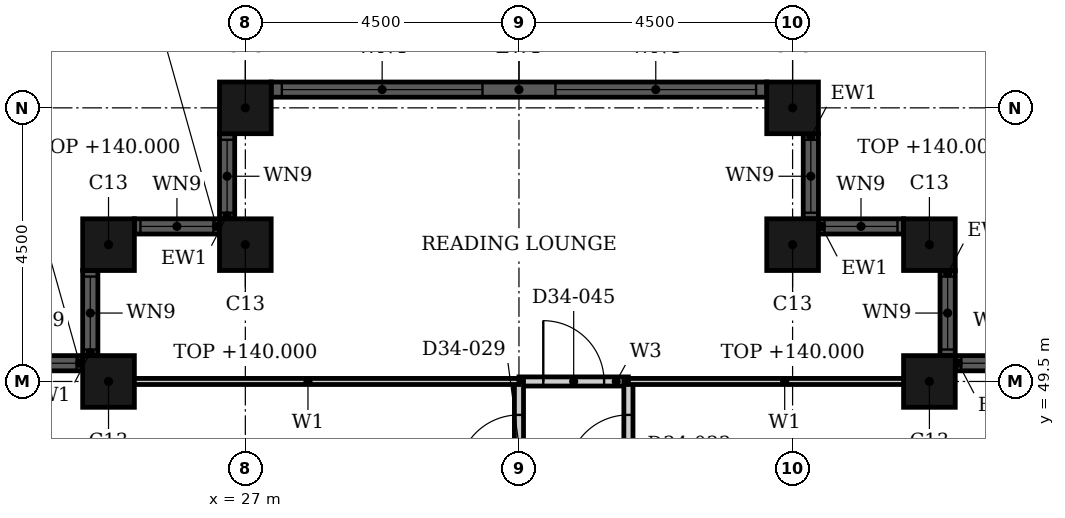
"""IFC4 building model, lengths in metres.
Left out: names, types, materials, properties, quantities, classifications, styles, units other than length and angle.
Written with IfcOpenShell. Run it as: python <this file> out.ifc"""

import sys

from ifc_helpers import new_model, si_unit, direction, frame, frame_2d, origin, origin_2d, place, context, subcontext, project, spatial, rectangle, hollow_rectangle, extrude, element, fill, save


model = new_model("IFC4")
c1 = context("Model", 3, precision=1e-05, world=origin(), true_north=direction((0.0, 1.0)))
c2 = subcontext(c1, "Body", "Model", "MODEL_VIEW")
j1 = project(units=[si_unit("LENGTHUNIT", "METRE"), si_unit("PLANEANGLEUNIT", "RADIAN")], contexts=[c1])
p1 = place(None, origin())
s1 = spatial("IfcSite", under=j1, at=p1, CompositionType="ELEMENT")
p2 = place(p1, origin())
s2 = spatial("IfcBuilding", under=s1, at=p2, CompositionType="ELEMENT")
p3 = place(p2, frame((0.0, 0.0, 136.8)))
s3 = spatial("IfcBuildingStorey", under=s2, at=p3, CompositionType="ELEMENT", Elevation=136.8)
for number, where, z_axis, x_axis in (
    (1, (38.25, 49.5, 0.0), (0.0, 0.0, 1.0), (1.0, 0.0, 0.0)),
    (2, (38.25, 51.75, 0.0), (0.0, 0.0, 1.0), (1.0, 0.0, 0.0)),
    (3, (36.0, 51.75, 0.0), (0.0, 0.0, 1.0), (1.0, 0.0, 0.0)),
    (4, (36.0, 54.0, 0.0), (0.0, 0.0, 1.0), (1.0, 0.0, 0.0)),
    (5, (27.0, 54.0, 0.0), (0.0, 0.0, 1.0), (1.0, 0.0, 0.0)),
    (6, (27.0, 51.75, 0.0), (0.0, 0.0, 1.0), (1.0, 0.0, 0.0)),
    (7, (24.75, 51.75, 0.0), (0.0, 0.0, 1.0), (1.0, 0.0, 0.0)),
    (8, (24.75, 49.5, 0.0), (0.0, 0.0, 1.0), (1.0, 0.0, 0.0)),
):
    element("IfcColumn", number, at=place(p3, frame(where, z_axis=z_axis, x_axis=x_axis)), inside=s3, PredefinedType="COLUMN", context=c2, shape_type="SweptSolid", body=[
        extrude(hollow_rectangle(XDim=0.85, YDim=0.85, WallThickness=0.026, at=origin_2d()), origin(), (0.0, 0.0, 1.0), 3.2),
    ])
p4 = place(p3, frame((40.075, 49.8, 0.0), z_axis=(0.0, 0.0, 1.0), x_axis=(-1.0, 0.0, 0.0)))
e9 = element("IfcWall", 9, at=p4, inside=s3, PredefinedType="SOLIDWALL", context=c2, shape_type="SweptSolid", body=[
    extrude(rectangle(XDim=1.4, YDim=0.25, at=frame_2d((0.7, 0.0))), origin(), (0.0, 0.0, 1.0), 3.6),
])
p5 = place(p4, frame((0.1, 0.0, 0.9)))
e10 = element("IfcOpeningElement", 10, at=p5, cuts=e9, PredefinedType="OPENING", context=c2, shape_type="SweptSolid", body=[
    extrude(rectangle(XDim=1.2, YDim=2.08, at=frame_2d((0.6, 1.04))), frame((0.0, 0.135, 0.0), z_axis=(0.0, -1.0, 0.0), x_axis=(1.0, 0.0, 0.0)), (0.0, 0.0, 1.0), 0.27),
])
p6 = place(p3, frame((38.55, 49.925, 0.0), z_axis=(0.0, 0.0, 1.0), x_axis=(0.0, 1.0, 0.0)))
e11 = element("IfcWall", 11, at=p6, inside=s3, PredefinedType="SOLIDWALL", context=c2, shape_type="SweptSolid", body=[
    extrude(rectangle(XDim=1.4, YDim=0.25, at=frame_2d((0.7, 0.0))), origin(), (0.0, 0.0, 1.0), 3.6),
])
p7 = place(p6, frame((0.1, 0.0, 0.9)))
e12 = element("IfcOpeningElement", 12, at=p7, cuts=e11, PredefinedType="OPENING", context=c2, shape_type="SweptSolid", body=[
    extrude(rectangle(XDim=1.2, YDim=2.08, at=frame_2d((0.6, 1.04))), frame((0.0, 0.135, 0.0), z_axis=(0.0, -1.0, 0.0), x_axis=(1.0, 0.0, 0.0)), (0.0, 0.0, 1.0), 0.27),
])
p8 = place(p3, frame((37.825, 52.05, 0.0), z_axis=(0.0, 0.0, 1.0), x_axis=(-1.0, 0.0, 0.0)))
e13 = element("IfcWall", 13, at=p8, inside=s3, PredefinedType="SOLIDWALL", context=c2, shape_type="SweptSolid", body=[
    extrude(rectangle(XDim=1.4, YDim=0.25, at=frame_2d((0.7, 0.0))), origin(), (0.0, 0.0, 1.0), 3.6),
])
p9 = place(p8, frame((0.1, 0.0, 0.9)))
e14 = element("IfcOpeningElement", 14, at=p9, cuts=e13, PredefinedType="OPENING", context=c2, shape_type="SweptSolid", body=[
    extrude(rectangle(XDim=1.2, YDim=2.08, at=frame_2d((0.6, 1.04))), frame((0.0, 0.135, 0.0), z_axis=(0.0, -1.0, 0.0), x_axis=(1.0, 0.0, 0.0)), (0.0, 0.0, 1.0), 0.27),
])
p10 = place(p3, frame((36.3, 52.175, 0.0), z_axis=(0.0, 0.0, 1.0), x_axis=(0.0, 1.0, 0.0)))
e15 = element("IfcWall", 15, at=p10, inside=s3, PredefinedType="SOLIDWALL", context=c2, shape_type="SweptSolid", body=[
    extrude(rectangle(XDim=1.4, YDim=0.25, at=frame_2d((0.7, 0.0))), origin(), (0.0, 0.0, 1.0), 3.6),
])
p11 = place(p10, frame((0.1, 0.0, 0.9)))
e16 = element("IfcOpeningElement", 16, at=p11, cuts=e15, PredefinedType="OPENING", context=c2, shape_type="SweptSolid", body=[
    extrude(rectangle(XDim=1.2, YDim=2.08, at=frame_2d((0.6, 1.04))), frame((0.0, 0.135, 0.0), z_axis=(0.0, -1.0, 0.0), x_axis=(1.0, 0.0, 0.0)), (0.0, 0.0, 1.0), 0.27),
])
p12 = place(p3, frame((35.575, 54.3, 0.0), z_axis=(0.0, 0.0, 1.0), x_axis=(-1.0, 0.0, 0.0)))
e17 = element("IfcWall", 17, at=p12, inside=s3, PredefinedType="SOLIDWALL", context=c2, shape_type="SweptSolid", body=[
    extrude(rectangle(XDim=8.15, YDim=0.25, at=frame_2d((4.075, 0.0))), origin(), (0.0, 0.0, 1.0), 3.6),
])
p13 = place(p12, frame((0.175, 0.0, 0.9)))
e18 = element("IfcOpeningElement", 18, at=p13, cuts=e17, PredefinedType="OPENING", context=c2, shape_type="SweptSolid", body=[
    extrude(rectangle(XDim=3.3, YDim=2.08, at=frame_2d((1.65, 1.04))), frame((0.0, 0.135, 0.0), z_axis=(0.0, -1.0, 0.0), x_axis=(1.0, 0.0, 0.0)), (0.0, 0.0, 1.0), 0.27),
])
p14 = place(p12, frame((4.675, 0.0, 0.9)))
e19 = element("IfcOpeningElement", 19, at=p14, cuts=e17, PredefinedType="OPENING", context=c2, shape_type="SweptSolid", body=[
    extrude(rectangle(XDim=3.3, YDim=2.08, at=frame_2d((1.65, 1.04))), frame((0.0, 0.135, 0.0), z_axis=(0.0, -1.0, 0.0), x_axis=(1.0, 0.0, 0.0)), (0.0, 0.0, 1.0), 0.27),
])
p15 = place(p3, frame((26.7, 53.575, 0.0), z_axis=(0.0, 0.0, 1.0), x_axis=(0.0, -1.0, 0.0)))
e20 = element("IfcWall", 20, at=p15, inside=s3, PredefinedType="SOLIDWALL", context=c2, shape_type="SweptSolid", body=[
    extrude(rectangle(XDim=1.4, YDim=0.25, at=frame_2d((0.7, 0.0))), origin(), (0.0, 0.0, 1.0), 3.6),
])
p16 = place(p15, frame((0.1, 0.0, 0.9)))
e21 = element("IfcOpeningElement", 21, at=p16, cuts=e20, PredefinedType="OPENING", context=c2, shape_type="SweptSolid", body=[
    extrude(rectangle(XDim=1.2, YDim=2.08, at=frame_2d((0.6, 1.04))), frame((0.0, 0.135, 0.0), z_axis=(0.0, -1.0, 0.0), x_axis=(1.0, 0.0, 0.0)), (0.0, 0.0, 1.0), 0.27),
])
p17 = place(p3, frame((26.575, 52.05, 0.0), z_axis=(0.0, 0.0, 1.0), x_axis=(-1.0, 0.0, 0.0)))
e22 = element("IfcWall", 22, at=p17, inside=s3, PredefinedType="SOLIDWALL", context=c2, shape_type="SweptSolid", body=[
    extrude(rectangle(XDim=1.4, YDim=0.25, at=frame_2d((0.7, 0.0))), origin(), (0.0, 0.0, 1.0), 3.6),
])
p18 = place(p17, frame((0.1, 0.0, 0.9)))
e23 = element("IfcOpeningElement", 23, at=p18, cuts=e22, PredefinedType="OPENING", context=c2, shape_type="SweptSolid", body=[
    extrude(rectangle(XDim=1.2, YDim=2.08, at=frame_2d((0.6, 1.04))), frame((0.0, 0.135, 0.0), z_axis=(0.0, -1.0, 0.0), x_axis=(1.0, 0.0, 0.0)), (0.0, 0.0, 1.0), 0.27),
])
p19 = place(p3, frame((24.45, 51.325, 0.0), z_axis=(0.0, 0.0, 1.0), x_axis=(0.0, -1.0, 0.0)))
e24 = element("IfcWall", 24, at=p19, inside=s3, PredefinedType="SOLIDWALL", context=c2, shape_type="SweptSolid", body=[
    extrude(rectangle(XDim=1.4, YDim=0.25, at=frame_2d((0.7, 0.0))), origin(), (0.0, 0.0, 1.0), 3.6),
])
p20 = place(p19, frame((0.1, 0.0, 0.9)))
e25 = element("IfcOpeningElement", 25, at=p20, cuts=e24, PredefinedType="OPENING", context=c2, shape_type="SweptSolid", body=[
    extrude(rectangle(XDim=1.2, YDim=2.08, at=frame_2d((0.6, 1.04))), frame((0.0, 0.135, 0.0), z_axis=(0.0, -1.0, 0.0), x_axis=(1.0, 0.0, 0.0)), (0.0, 0.0, 1.0), 0.27),
])
p21 = place(p3, frame((24.325, 49.8, 0.0), z_axis=(0.0, 0.0, 1.0), x_axis=(-1.0, 0.0, 0.0)))
e26 = element("IfcWall", 26, at=p21, inside=s3, PredefinedType="SOLIDWALL", context=c2, shape_type="SweptSolid", body=[
    extrude(rectangle(XDim=1.4, YDim=0.25, at=frame_2d((0.7, 0.0))), origin(), (0.0, 0.0, 1.0), 3.6),
])
p22 = place(p21, frame((0.1, 0.0, 0.9)))
e27 = element("IfcOpeningElement", 27, at=p22, cuts=e26, PredefinedType="OPENING", context=c2, shape_type="SweptSolid", body=[
    extrude(rectangle(XDim=1.2, YDim=2.08, at=frame_2d((0.6, 1.04))), frame((0.0, 0.135, 0.0), z_axis=(0.0, -1.0, 0.0), x_axis=(1.0, 0.0, 0.0)), (0.0, 0.0, 1.0), 0.27),
])
p23 = place(p3, frame((31.5, 49.5, 0.0), z_axis=(0.0, 0.0, 1.0), x_axis=(1.0, 0.0, 0.0)))
e28 = element("IfcWall", 28, at=p23, inside=s3, PredefinedType="PARTITIONING", context=c2, shape_type="SweptSolid", body=[
    extrude(rectangle(XDim=1.8, YDim=0.15, at=frame_2d((0.9, 0.0))), origin(), (0.0, 0.0, 1.0), 3.2),
])
p24 = place(p23, frame((0.4, 0.0, 0.0)))
e29 = element("IfcOpeningElement", 29, at=p24, cuts=e28, PredefinedType="OPENING", context=c2, shape_type="SweptSolid", body=[
    extrude(rectangle(XDim=1.0, YDim=2.1, at=frame_2d((0.5, 1.05))), frame((0.0, 0.085, 0.0), z_axis=(0.0, -1.0, 0.0), x_axis=(1.0, 0.0, 0.0)), (0.0, 0.0, 1.0), 0.17),
])
p25 = place(p3, frame((31.5, 33.3, 0.0), z_axis=(0.0, 0.0, 1.0), x_axis=(0.0, 1.0, 0.0)))
e30 = element("IfcWall", 30, at=p25, inside=s3, PredefinedType="PARTITIONING", context=c2, shape_type="SweptSolid", body=[
    extrude(rectangle(XDim=16.2, YDim=0.15, at=frame_2d((8.1, 0.0))), origin(), (0.0, 0.0, 1.0), 2.48),
])
p26 = place(p25, frame((10.15, 0.0, 0.0)))
e31 = element("IfcOpeningElement", 31, at=p26, cuts=e30, PredefinedType="OPENING", context=c2, shape_type="SweptSolid", body=[
    extrude(rectangle(XDim=1.0, YDim=2.1, at=frame_2d((0.5, 1.05))), frame((0.0, 0.085, 0.0), z_axis=(0.0, -1.0, 0.0), x_axis=(1.0, 0.0, 0.0)), (0.0, 0.0, 1.0), 0.17),
])
p27 = place(p25, frame((14.65, 0.0, 0.0)))
e32 = element("IfcOpeningElement", 32, at=p27, cuts=e30, PredefinedType="OPENING", context=c2, shape_type="SweptSolid", body=[
    extrude(rectangle(XDim=1.0, YDim=2.1, at=frame_2d((0.5, 1.05))), frame((0.0, 0.085, 0.0), z_axis=(0.0, -1.0, 0.0), x_axis=(1.0, 0.0, 0.0)), (0.0, 0.0, 1.0), 0.17),
])
p28 = place(p3, frame((33.3, 33.3, 0.0), z_axis=(0.0, 0.0, 1.0), x_axis=(0.0, 1.0, 0.0)))
e33 = element("IfcWall", 33, at=p28, inside=s3, PredefinedType="PARTITIONING", context=c2, shape_type="SweptSolid", body=[
    extrude(rectangle(XDim=16.2, YDim=0.15, at=frame_2d((8.1, 0.0))), origin(), (0.0, 0.0, 1.0), 3.2),
])
p29 = place(p28, frame((10.15, 0.0, 0.0)))
e34 = element("IfcOpeningElement", 34, at=p29, cuts=e33, PredefinedType="OPENING", context=c2, shape_type="SweptSolid", body=[
    extrude(rectangle(XDim=1.0, YDim=2.1, at=frame_2d((0.5, 1.05))), frame((0.0, 0.085, 0.0), z_axis=(0.0, -1.0, 0.0), x_axis=(1.0, 0.0, 0.0)), (0.0, 0.0, 1.0), 0.17),
])
p30 = place(p28, frame((14.65, 0.0, 0.0)))
e35 = element("IfcOpeningElement", 35, at=p30, cuts=e33, PredefinedType="OPENING", context=c2, shape_type="SweptSolid", body=[
    extrude(rectangle(XDim=1.0, YDim=2.1, at=frame_2d((0.5, 1.05))), frame((0.0, 0.085, 0.0), z_axis=(0.0, -1.0, 0.0), x_axis=(1.0, 0.0, 0.0)), (0.0, 0.0, 1.0), 0.17),
])
p31 = place(p3, frame((33.3, 49.5, 0.0), z_axis=(0.0, 0.0, 1.0), x_axis=(1.0, 0.0, 0.0)))
e36 = element("IfcWall", 36, at=p31, inside=s3, PredefinedType="PARTITIONING", context=c2, shape_type="SweptSolid", body=[
    extrude(rectangle(XDim=5.14, YDim=0.1, at=frame_2d((2.57, 0.0))), origin(), (0.0, 0.0, 1.0), 3.2),
])
p32 = place(p3, frame((24.56, 49.5, 0.0), z_axis=(0.0, 0.0, 1.0), x_axis=(1.0, 0.0, 0.0)))
e37 = element("IfcWall", 37, at=p32, inside=s3, PredefinedType="PARTITIONING", context=c2, shape_type="SweptSolid", body=[
    extrude(rectangle(XDim=6.94, YDim=0.1, at=frame_2d((3.47, 0.0))), origin(), (0.0, 0.0, 1.0), 3.2),
])
p33 = place(p5, origin())
e38 = element("IfcWindow", 38, at=p33, inside=s3, PartitioningType="SINGLE_PANEL", PredefinedType="WINDOW", context=c2, shape_type="SweptSolid", body=[
    extrude(rectangle(XDim=1.2, YDim=2.08, at=frame_2d((0.6, 1.04))), frame((0.0, 0.03, 0.0), z_axis=(0.0, -1.0, 0.0), x_axis=(1.0, 0.0, 0.0)), (0.0, 0.0, 1.0), 0.06),
])
fill(e10, e38)
p34 = place(p7, origin())
e39 = element("IfcWindow", 39, at=p34, inside=s3, PartitioningType="SINGLE_PANEL", PredefinedType="WINDOW", context=c2, shape_type="SweptSolid", body=[
    extrude(rectangle(XDim=1.2, YDim=2.08, at=frame_2d((0.6, 1.04))), frame((0.0, 0.03, 0.0), z_axis=(0.0, -1.0, 0.0), x_axis=(1.0, 0.0, 0.0)), (0.0, 0.0, 1.0), 0.06),
])
fill(e12, e39)
p35 = place(p9, origin())
e40 = element("IfcWindow", 40, at=p35, inside=s3, PartitioningType="SINGLE_PANEL", PredefinedType="WINDOW", context=c2, shape_type="SweptSolid", body=[
    extrude(rectangle(XDim=1.2, YDim=2.08, at=frame_2d((0.6, 1.04))), frame((0.0, 0.03, 0.0), z_axis=(0.0, -1.0, 0.0), x_axis=(1.0, 0.0, 0.0)), (0.0, 0.0, 1.0), 0.06),
])
fill(e14, e40)
p36 = place(p11, origin())
e41 = element("IfcWindow", 41, at=p36, inside=s3, PartitioningType="SINGLE_PANEL", PredefinedType="WINDOW", context=c2, shape_type="SweptSolid", body=[
    extrude(rectangle(XDim=1.2, YDim=2.08, at=frame_2d((0.6, 1.04))), frame((0.0, 0.03, 0.0), z_axis=(0.0, -1.0, 0.0), x_axis=(1.0, 0.0, 0.0)), (0.0, 0.0, 1.0), 0.06),
])
fill(e16, e41)
p37 = place(p13, origin())
e42 = element("IfcWindow", 42, at=p37, inside=s3, PartitioningType="SINGLE_PANEL", PredefinedType="WINDOW", context=c2, shape_type="SweptSolid", body=[
    extrude(rectangle(XDim=3.3, YDim=2.08, at=frame_2d((1.65, 1.04))), frame((0.0, 0.03, 0.0), z_axis=(0.0, -1.0, 0.0), x_axis=(1.0, 0.0, 0.0)), (0.0, 0.0, 1.0), 0.06),
])
fill(e18, e42)
p38 = place(p14, origin())
e43 = element("IfcWindow", 43, at=p38, inside=s3, PartitioningType="SINGLE_PANEL", PredefinedType="WINDOW", context=c2, shape_type="SweptSolid", body=[
    extrude(rectangle(XDim=3.3, YDim=2.08, at=frame_2d((1.65, 1.04))), frame((0.0, 0.03, 0.0), z_axis=(0.0, -1.0, 0.0), x_axis=(1.0, 0.0, 0.0)), (0.0, 0.0, 1.0), 0.06),
])
fill(e19, e43)
p39 = place(p16, origin())
e44 = element("IfcWindow", 44, at=p39, inside=s3, PartitioningType="SINGLE_PANEL", PredefinedType="WINDOW", context=c2, shape_type="SweptSolid", body=[
    extrude(rectangle(XDim=1.2, YDim=2.08, at=frame_2d((0.6, 1.04))), frame((0.0, 0.03, 0.0), z_axis=(0.0, -1.0, 0.0), x_axis=(1.0, 0.0, 0.0)), (0.0, 0.0, 1.0), 0.06),
])
fill(e21, e44)
p40 = place(p18, origin())
e45 = element("IfcWindow", 45, at=p40, inside=s3, PartitioningType="SINGLE_PANEL", PredefinedType="WINDOW", context=c2, shape_type="SweptSolid", body=[
    extrude(rectangle(XDim=1.2, YDim=2.08, at=frame_2d((0.6, 1.04))), frame((0.0, 0.03, 0.0), z_axis=(0.0, -1.0, 0.0), x_axis=(1.0, 0.0, 0.0)), (0.0, 0.0, 1.0), 0.06),
])
fill(e23, e45)
p41 = place(p20, origin())
e46 = element("IfcWindow", 46, at=p41, inside=s3, PartitioningType="SINGLE_PANEL", PredefinedType="WINDOW", context=c2, shape_type="SweptSolid", body=[
    extrude(rectangle(XDim=1.2, YDim=2.08, at=frame_2d((0.6, 1.04))), frame((0.0, 0.03, 0.0), z_axis=(0.0, -1.0, 0.0), x_axis=(1.0, 0.0, 0.0)), (0.0, 0.0, 1.0), 0.06),
])
fill(e25, e46)
p42 = place(p22, origin())
e47 = element("IfcWindow", 47, at=p42, inside=s3, PartitioningType="SINGLE_PANEL", PredefinedType="WINDOW", context=c2, shape_type="SweptSolid", body=[
    extrude(rectangle(XDim=1.2, YDim=2.08, at=frame_2d((0.6, 1.04))), frame((0.0, 0.03, 0.0), z_axis=(0.0, -1.0, 0.0), x_axis=(1.0, 0.0, 0.0)), (0.0, 0.0, 1.0), 0.06),
])
fill(e27, e47)
p43 = place(p27, origin())
e48 = element("IfcDoor", 48, at=p43, inside=s3, OperationType="SINGLE_SWING_RIGHT", PredefinedType="DOOR", context=c2, shape_type="SweptSolid", body=[
    extrude(rectangle(XDim=1.0, YDim=2.1, at=frame_2d((0.5, 1.05))), frame((0.0, 0.025, 0.0), z_axis=(0.0, -1.0, 0.0), x_axis=(1.0, 0.0, 0.0)), (0.0, 0.0, 1.0), 0.05),
])
fill(e32, e48)
p44 = place(p30, origin())
e49 = element("IfcDoor", 49, at=p44, inside=s3, OperationType="SINGLE_SWING_RIGHT", PredefinedType="DOOR", context=c2, shape_type="SweptSolid", body=[
    extrude(rectangle(XDim=1.0, YDim=2.1, at=frame_2d((0.5, 1.05))), frame((0.0, 0.025, 0.0), z_axis=(0.0, -1.0, 0.0), x_axis=(1.0, 0.0, 0.0)), (0.0, 0.0, 1.0), 0.05),
])
fill(e35, e49)
p45 = place(p24, origin())
e50 = element("IfcDoor", 50, at=p45, inside=s3, OperationType="SINGLE_SWING_RIGHT", PredefinedType="DOOR", context=c2, shape_type="SweptSolid", body=[
    extrude(rectangle(XDim=1.0, YDim=2.1, at=frame_2d((0.5, 1.05))), frame((0.0, 0.025, 0.0), z_axis=(0.0, -1.0, 0.0), x_axis=(1.0, 0.0, 0.0)), (0.0, 0.0, 1.0), 0.05),
])
fill(e29, e50)
save(model, sys.argv[1])
